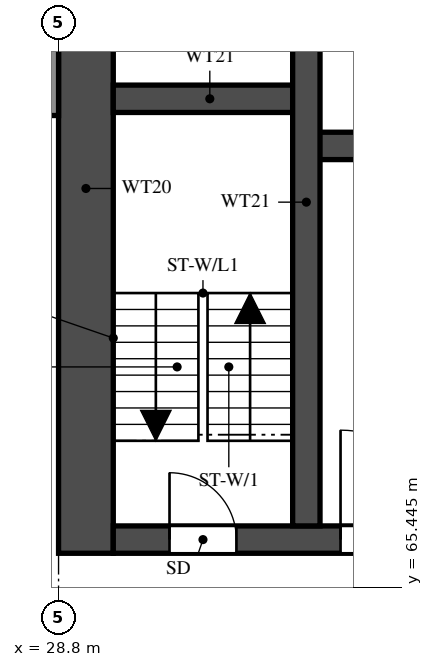
"""IFC4 building model, lengths in metres.
Left out: names, types, materials, properties, quantities, classifications, styles, units other than length and angle.
Written with IfcOpenShell. Run it as: python <this file> out.ifc"""

import sys

from ifc_helpers import new_model, si_unit, direction, frame, frame_2d, origin, place, context, subcontext, project, spatial, rectangle, extrude, element, fill, save


model = new_model("IFC4")
c1 = context("Model", 3, precision=1e-05, world=origin(), true_north=direction((0.0, 1.0)))
c2 = subcontext(c1, "Body", "Model", "MODEL_VIEW")
j1 = project(units=[si_unit("LENGTHUNIT", "METRE"), si_unit("PLANEANGLEUNIT", "RADIAN")], contexts=[c1])
p1 = place(None, origin())
s1 = spatial("IfcSite", under=j1, at=p1, CompositionType="ELEMENT")
p2 = place(p1, origin())
s2 = spatial("IfcBuilding", under=s1, at=p2, CompositionType="ELEMENT")
p3 = place(p2, frame((0.0, 0.0, 30.5)))
s3 = spatial("IfcBuildingStorey", under=s2, at=p3, CompositionType="ELEMENT", Elevation=30.5)
p4 = place(p3, frame((29.25, 66.0, 0.0), z_axis=(0.0, 0.0, 1.0), x_axis=(0.0, 1.0, 0.0)))
e1 = element("IfcWall", 1, at=p4, inside=s3, PredefinedType="SHEAR", context=c2, shape_type="SweptSolid", body=[
    extrude(rectangle(XDim=12.0, YDim=0.9, at=frame_2d((6.0, 0.0))), origin(), (0.0, 0.0, 1.0), 3.18),
])
p5 = place(p3, frame((29.7, 66.225, 0.0), z_axis=(0.0, 0.0, 1.0), x_axis=(1.0, 0.0, 0.0)))
e2 = element("IfcWall", 2, at=p5, inside=s3, PredefinedType="SHEAR", context=c2, shape_type="SweptSolid", body=[
    extrude(rectangle(XDim=41.4, YDim=0.45, at=frame_2d((20.7, 0.0))), origin(), (0.0, 0.0, 1.0), 3.18),
])
p6 = place(p5, frame((0.925, 0.0, 0.0)))
e3 = element("IfcOpeningElement", 3, at=p6, cuts=e2, PredefinedType="OPENING", context=c2, shape_type="SweptSolid", body=[
    extrude(rectangle(XDim=1.1, YDim=2.1, at=frame_2d((0.55, 1.05))), frame((0.0, 0.235, 0.0), z_axis=(0.0, -1.0, 0.0), x_axis=(1.0, 0.0, 0.0)), (0.0, 0.0, 1.0), 0.47),
])
p7 = place(p5, frame((3.738, 0.0, 0.0)))
e4 = element("IfcOpeningElement", 4, at=p7, cuts=e2, PredefinedType="OPENING", context=c2, shape_type="SweptSolid", body=[
    extrude(rectangle(XDim=1.8, YDim=2.1, at=frame_2d((0.9, 1.05))), frame((0.0, 0.235, 0.0), z_axis=(0.0, -1.0, 0.0), x_axis=(1.0, 0.0, 0.0)), (0.0, 0.0, 1.0), 0.47),
])
p8 = place(p3, frame((32.875, 72.7, 0.0), z_axis=(0.0, 0.0, 1.0), x_axis=(1.0, 0.0, 0.0)))
e5 = element("IfcWall", 5, at=p8, inside=s3, PredefinedType="SHEAR", context=c2, shape_type="SweptSolid", body=[
    extrude(rectangle(XDim=35.05, YDim=0.45, at=frame_2d((17.525, 0.0))), origin(), (0.0, 0.0, 1.0), 3.18),
])
p9 = place(p8, frame((19.8, 0.0, 0.0)))
e6 = element("IfcOpeningElement", 6, at=p9, cuts=e5, PredefinedType="OPENING", context=c2, shape_type="SweptSolid", body=[
    extrude(rectangle(XDim=1.1, YDim=2.1, at=frame_2d((0.55, 1.05))), frame((0.0, 0.235, 0.0), z_axis=(0.0, -1.0, 0.0), x_axis=(1.0, 0.0, 0.0)), (0.0, 0.0, 1.0), 0.47),
])
p10 = place(p8, frame((27.65, 0.0, 0.0)))
e7 = element("IfcOpeningElement", 7, at=p10, cuts=e5, PredefinedType="OPENING", context=c2, shape_type="SweptSolid", body=[
    extrude(rectangle(XDim=1.1, YDim=2.1, at=frame_2d((0.55, 1.05))), frame((0.0, 0.235, 0.0), z_axis=(0.0, -1.0, 0.0), x_axis=(1.0, 0.0, 0.0)), (0.0, 0.0, 1.0), 0.47),
])
p11 = place(p8, frame((30.25, 0.0, 0.0)))
e8 = element("IfcOpeningElement", 8, at=p11, cuts=e5, PredefinedType="OPENING", context=c2, shape_type="SweptSolid", body=[
    extrude(rectangle(XDim=1.1, YDim=2.1, at=frame_2d((0.55, 1.05))), frame((0.0, 0.235, 0.0), z_axis=(0.0, -1.0, 0.0), x_axis=(1.0, 0.0, 0.0)), (0.0, 0.0, 1.0), 0.47),
])
p12 = place(p8, frame((3.75, 0.0, 0.0)))
e9 = element("IfcOpeningElement", 9, at=p12, cuts=e5, PredefinedType="OPENING", context=c2, shape_type="SweptSolid", body=[
    extrude(rectangle(XDim=1.1, YDim=2.1, at=frame_2d((0.55, 1.05))), frame((0.0, 0.235, 0.0), z_axis=(0.0, -1.0, 0.0), x_axis=(1.0, 0.0, 0.0)), (0.0, 0.0, 1.0), 0.47),
])
p13 = place(p8, frame((6.5, 0.0, 0.0)))
e10 = element("IfcOpeningElement", 10, at=p13, cuts=e5, PredefinedType="OPENING", context=c2, shape_type="SweptSolid", body=[
    extrude(rectangle(XDim=1.1, YDim=2.1, at=frame_2d((0.55, 1.05))), frame((0.0, 0.235, 0.0), z_axis=(0.0, -1.0, 0.0), x_axis=(1.0, 0.0, 0.0)), (0.0, 0.0, 1.0), 0.47),
])
p14 = place(p8, frame((9.25, 0.0, 0.0)))
e11 = element("IfcOpeningElement", 11, at=p14, cuts=e5, PredefinedType="OPENING", context=c2, shape_type="SweptSolid", body=[
    extrude(rectangle(XDim=1.1, YDim=2.1, at=frame_2d((0.55, 1.05))), frame((0.0, 0.235, 0.0), z_axis=(0.0, -1.0, 0.0), x_axis=(1.0, 0.0, 0.0)), (0.0, 0.0, 1.0), 0.47),
])
p15 = place(p8, frame((12.0, 0.0, 0.0)))
e12 = element("IfcOpeningElement", 12, at=p15, cuts=e5, PredefinedType="OPENING", context=c2, shape_type="SweptSolid", body=[
    extrude(rectangle(XDim=1.1, YDim=2.1, at=frame_2d((0.55, 1.05))), frame((0.0, 0.235, 0.0), z_axis=(0.0, -1.0, 0.0), x_axis=(1.0, 0.0, 0.0)), (0.0, 0.0, 1.0), 0.47),
])
p16 = place(p8, frame((14.75, 0.0, 0.0)))
e13 = element("IfcOpeningElement", 13, at=p16, cuts=e5, PredefinedType="OPENING", context=c2, shape_type="SweptSolid", body=[
    extrude(rectangle(XDim=1.1, YDim=2.1, at=frame_2d((0.55, 1.05))), frame((0.0, 0.235, 0.0), z_axis=(0.0, -1.0, 0.0), x_axis=(1.0, 0.0, 0.0)), (0.0, 0.0, 1.0), 0.47),
])
p17 = place(p8, frame((17.5, 0.0, 0.0)))
e14 = element("IfcOpeningElement", 14, at=p17, cuts=e5, PredefinedType="OPENING", context=c2, shape_type="SweptSolid", body=[
    extrude(rectangle(XDim=1.1, YDim=2.1, at=frame_2d((0.55, 1.05))), frame((0.0, 0.235, 0.0), z_axis=(0.0, -1.0, 0.0), x_axis=(1.0, 0.0, 0.0)), (0.0, 0.0, 1.0), 0.47),
])
p18 = place(p8, frame((0.913, 0.0, 0.0)))
e15 = element("IfcOpeningElement", 15, at=p18, cuts=e5, PredefinedType="OPENING", context=c2, shape_type="SweptSolid", body=[
    extrude(rectangle(XDim=1.1, YDim=2.1, at=frame_2d((0.55, 1.05))), frame((0.0, 0.235, 0.0), z_axis=(0.0, -1.0, 0.0), x_axis=(1.0, 0.0, 0.0)), (0.0, 0.0, 1.0), 0.47),
])
p19 = place(p3, frame((29.7, 73.475, 0.0), z_axis=(0.0, 0.0, 1.0), x_axis=(1.0, 0.0, 0.0)))
e16 = element("IfcWall", 16, at=p19, inside=s3, PredefinedType="SHEAR", context=c2, shape_type="SweptSolid", body=[
    extrude(rectangle(XDim=3.175, YDim=0.45, at=frame_2d((1.587, 0.0))), origin(), (0.0, 0.0, 1.0), 3.18),
])
p20 = place(p3, frame((32.875, 66.45, 0.0), z_axis=(0.0, 0.0, 1.0), x_axis=(0.0, 1.0, 0.0)))
e17 = element("IfcWall", 17, at=p20, inside=s3, PredefinedType="SHEAR", context=c2, shape_type="SweptSolid", body=[
    extrude(rectangle(XDim=10.65, YDim=0.45, at=frame_2d((5.325, 0.0))), origin(), (0.0, 0.0, 1.0), 3.18),
])
p21 = place(p3, frame((28.7, 73.2, 0.0), z_axis=(0.0, 0.0, 1.0), x_axis=(0.0, 1.0, 0.0)))
e18 = element("IfcWall", 18, at=p21, inside=s3, PredefinedType="SOLIDWALL", context=c2, shape_type="SweptSolid", body=[
    extrude(rectangle(XDim=4.8, YDim=0.2, at=frame_2d((2.4, 0.0))), origin(), (0.0, 0.0, 1.0), 3.18),
])
p22 = place(p6, origin())
e19 = element("IfcDoor", 19, at=p22, inside=s3, OperationType="SINGLE_SWING_LEFT", PredefinedType="DOOR", context=c2, shape_type="SweptSolid", body=[
    extrude(rectangle(XDim=1.1, YDim=2.1, at=frame_2d((0.55, 1.05))), frame((0.0, 0.025, 0.0), z_axis=(0.0, -1.0, 0.0), x_axis=(1.0, 0.0, 0.0)), (0.0, 0.0, 1.0), 0.05),
])
fill(e3, e19)
p23 = place(p7, origin())
e20 = element("IfcDoor", 20, at=p23, inside=s3, OperationType="DOUBLE_DOOR_SINGLE_SWING", PredefinedType="DOOR", context=c2, shape_type="SweptSolid", body=[
    extrude(rectangle(XDim=1.8, YDim=2.1, at=frame_2d((0.9, 1.05))), frame((0.0, 0.025, 0.0), z_axis=(0.0, -1.0, 0.0), x_axis=(1.0, 0.0, 0.0)), (0.0, 0.0, 1.0), 0.05),
])
fill(e4, e20)
save(model, sys.argv[1])
